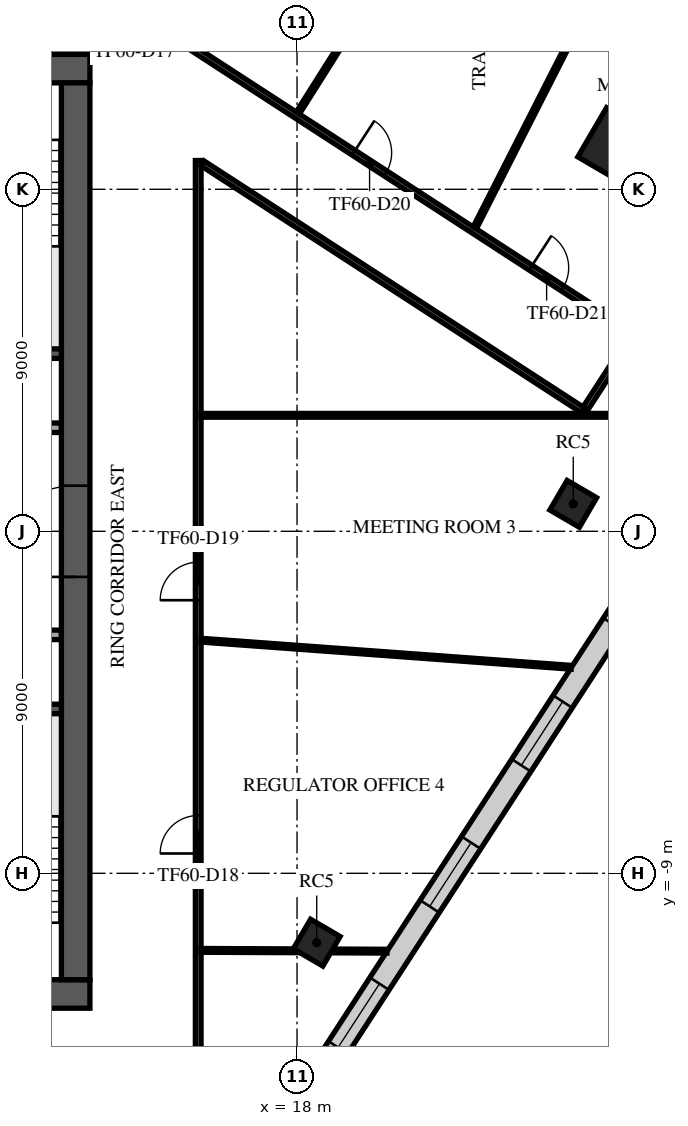
"""IFC4 building model, lengths in metres.
Left out: names, types, materials, properties, quantities, classifications, styles, units other than length and angle.
Written with IfcOpenShell. Run it as: python <this file> out.ifc"""

import sys

from ifc_helpers import new_model, si_unit, direction, frame, frame_2d, origin, origin_2d, place, context, subcontext, project, spatial, rectangle, extrude, element, fill, save


model = new_model("IFC4")
c1 = context("Model", 3, precision=1e-05, world=origin(), true_north=direction((0.0, 1.0)))
c2 = subcontext(c1, "Body", "Model", "MODEL_VIEW")
j1 = project(units=[si_unit("LENGTHUNIT", "METRE"), si_unit("PLANEANGLEUNIT", "RADIAN")], contexts=[c1])
p1 = place(None, origin())
s1 = spatial("IfcSite", under=j1, at=p1, CompositionType="ELEMENT")
p2 = place(p1, origin())
s2 = spatial("IfcBuilding", under=s1, at=p2, CompositionType="ELEMENT")
p3 = place(p2, frame((0.0, 0.0, 254.9)))
s3 = spatial("IfcBuildingStorey", under=s2, at=p3, CompositionType="ELEMENT", Elevation=254.9)
for number, where, z_axis, x_axis in (
    (1, (18.518, -10.825, 0.0), (0.0, 0.0, 1.0), (0.505, 0.863, 0.0)),
    (2, (25.268, 0.722, 0.0), (0.0, 0.0, 1.0), (0.505, 0.863, 0.0)),
):
    element("IfcColumn", number, at=place(p3, frame(where, z_axis=z_axis, x_axis=x_axis)), inside=s3, PredefinedType="COLUMN", context=c2, shape_type="SweptSolid", body=[
        extrude(rectangle(XDim=0.9, YDim=0.9, at=origin_2d()), origin(), (0.0, 0.0, 1.0), 4.0),
    ])
p4 = place(p3, frame((26.415, 10.122, 0.0), z_axis=(0.0, 0.0, 1.0), x_axis=(0.504643651291, 0.863327739165, 0.0)))
e3 = element("IfcColumn", 3, at=p4, inside=s3, PredefinedType="COLUMN", context=c2, shape_type="SweptSolid", body=[
    extrude(rectangle(XDim=1.5, YDim=1.5, at=origin_2d()), origin(), (0.0, 0.0, 1.0), 4.0),
])
p5 = place(p3, frame((-12.55, 12.175, 0.0), z_axis=(0.0, 0.0, 1.0), x_axis=(1.0, 0.0, 0.0)))
e4 = element("IfcWall", 4, at=p5, inside=s3, PredefinedType="SHEAR", context=c2, shape_type="SweptSolid", body=[
    extrude(rectangle(XDim=25.1, YDim=0.75, at=frame_2d((12.55, 0.0))), origin(), (0.0, 0.0, 1.0), 3.64),
])
p6 = place(p5, frame((11.35, 0.0, 0.0)))
e5 = element("IfcOpeningElement", 5, at=p6, cuts=e4, PredefinedType="OPENING", context=c2, shape_type="SweptSolid", body=[
    extrude(rectangle(XDim=2.4, YDim=2.4, at=frame_2d((1.2, 1.2))), frame((0.0, 0.385, 0.0), z_axis=(0.0, -1.0, 0.0), x_axis=(1.0, 0.0, 0.0)), (0.0, 0.0, 1.0), 0.77),
])
p7 = place(p5, frame((22.175, 0.0, 0.0)))
e6 = element("IfcOpeningElement", 6, at=p7, cuts=e4, PredefinedType="OPENING", context=c2, shape_type="SweptSolid", body=[
    extrude(rectangle(XDim=1.2, YDim=2.1, at=frame_2d((0.6, 1.05))), frame((0.0, 0.385, 0.0), z_axis=(0.0, -1.0, 0.0), x_axis=(1.0, 0.0, 0.0)), (0.0, 0.0, 1.0), 0.77),
])
p8 = place(p5, frame((1.15, 0.0, 0.0)))
e7 = element("IfcOpeningElement", 7, at=p8, cuts=e4, PredefinedType="OPENING", context=c2, shape_type="SweptSolid", body=[
    extrude(rectangle(XDim=1.0, YDim=2.1, at=frame_2d((0.5, 1.05))), frame((0.0, 0.385, 0.0), z_axis=(0.0, -1.0, 0.0), x_axis=(1.0, 0.0, 0.0)), (0.0, 0.0, 1.0), 0.77),
])
p9 = place(p3, frame((-12.55, -12.175, 0.0), z_axis=(0.0, 0.0, 1.0), x_axis=(1.0, 0.0, 0.0)))
e8 = element("IfcWall", 8, at=p9, inside=s3, PredefinedType="SHEAR", context=c2, shape_type="SweptSolid", body=[
    extrude(rectangle(XDim=25.1, YDim=0.75, at=frame_2d((12.55, 0.0))), origin(), (0.0, 0.0, 1.0), 3.64),
])
p10 = place(p9, frame((7.45, 0.0, 0.0)))
e9 = element("IfcOpeningElement", 9, at=p10, cuts=e8, PredefinedType="OPENING", context=c2, shape_type="SweptSolid", body=[
    extrude(rectangle(XDim=2.0, YDim=2.1, at=frame_2d((1.0, 1.05))), frame((0.0, 0.385, 0.0), z_axis=(0.0, -1.0, 0.0), x_axis=(1.0, 0.0, 0.0)), (0.0, 0.0, 1.0), 0.77),
])
p11 = place(p9, frame((17.575, 0.0, 0.0)))
e10 = element("IfcOpeningElement", 10, at=p11, cuts=e8, PredefinedType="OPENING", context=c2, shape_type="SweptSolid", body=[
    extrude(rectangle(XDim=1.2, YDim=2.1, at=frame_2d((0.6, 1.05))), frame((0.0, 0.385, 0.0), z_axis=(0.0, -1.0, 0.0), x_axis=(1.0, 0.0, 0.0)), (0.0, 0.0, 1.0), 0.77),
])
p12 = place(p9, frame((1.725, 0.0, 0.0)))
e11 = element("IfcOpeningElement", 11, at=p12, cuts=e8, PredefinedType="OPENING", context=c2, shape_type="SweptSolid", body=[
    extrude(rectangle(XDim=1.2, YDim=2.1, at=frame_2d((0.6, 1.05))), frame((0.0, 0.385, 0.0), z_axis=(0.0, -1.0, 0.0), x_axis=(1.0, 0.0, 0.0)), (0.0, 0.0, 1.0), 0.77),
])
p13 = place(p9, frame((22.175, 0.0, 0.0)))
e12 = element("IfcOpeningElement", 12, at=p13, cuts=e8, PredefinedType="OPENING", context=c2, shape_type="SweptSolid", body=[
    extrude(rectangle(XDim=1.2, YDim=2.1, at=frame_2d((0.6, 1.05))), frame((0.0, 0.385, 0.0), z_axis=(0.0, -1.0, 0.0), x_axis=(1.0, 0.0, 0.0)), (0.0, 0.0, 1.0), 0.77),
])
p14 = place(p3, frame((12.175, -11.8, 0.0), z_axis=(0.0, 0.0, 1.0), x_axis=(0.0, 1.0, 0.0)))
e13 = element("IfcWall", 13, at=p14, inside=s3, PredefinedType="SHEAR", context=c2, shape_type="SweptSolid", body=[
    extrude(rectangle(XDim=23.6, YDim=0.75, at=frame_2d((11.8, 0.0))), origin(), (0.0, 0.0, 1.0), 3.64),
])
p15 = place(p14, frame((10.6, 0.0, 0.0)))
e14 = element("IfcOpeningElement", 14, at=p15, cuts=e13, PredefinedType="OPENING", context=c2, shape_type="SweptSolid", body=[
    extrude(rectangle(XDim=2.4, YDim=2.4, at=frame_2d((1.2, 1.2))), frame((0.0, 0.385, 0.0), z_axis=(0.0, -1.0, 0.0), x_axis=(1.0, 0.0, 0.0)), (0.0, 0.0, 1.0), 0.77),
])
for number, where, z_axis, x_axis in (
    (15, (8.65, 4.675, 0.0), (0.0, 0.0, 1.0), (1.0, 0.0, 0.0)),
    (16, (8.65, -4.675, 0.0), (0.0, 0.0, 1.0), (1.0, 0.0, 0.0)),
):
    element("IfcWall", number, at=place(p3, frame(where, z_axis=z_axis, x_axis=x_axis)), inside=s3, PredefinedType="SOLIDWALL", context=c2, shape_type="SweptSolid", body=[
        extrude(rectangle(XDim=3.15, YDim=0.25, at=frame_2d((1.575, 0.0))), origin(), (0.0, 0.0, 1.0), 3.64),
    ])
p16 = place(p3, frame((5.63, -2.725, 0.0), z_axis=(0.0, 0.0, 1.0), x_axis=(1.0, 0.0, 0.0)))
e17 = element("IfcWall", 17, at=p16, inside=s3, PredefinedType="PARTITIONING", context=c2, shape_type="SweptSolid", body=[
    extrude(rectangle(XDim=6.165, YDim=0.25, at=frame_2d((3.083, 0.0))), origin(), (0.0, 0.0, 1.0), 3.64),
])
p17 = place(p16, frame((0.745, 0.0, 0.0)))
e18 = element("IfcOpeningElement", 18, at=p17, cuts=e17, PredefinedType="OPENING", context=c2, shape_type="SweptSolid", body=[
    extrude(rectangle(XDim=1.0, YDim=2.1, at=frame_2d((0.5, 1.05))), frame((0.0, 0.135, 0.0), z_axis=(0.0, -1.0, 0.0), x_axis=(1.0, 0.0, 0.0)), (0.0, 0.0, 1.0), 0.27),
])
p18 = place(p16, frame((3.92, 0.0, 0.0)))
e19 = element("IfcOpeningElement", 19, at=p18, cuts=e17, PredefinedType="OPENING", context=c2, shape_type="SweptSolid", body=[
    extrude(rectangle(XDim=0.9, YDim=2.1, at=frame_2d((0.45, 1.05))), frame((0.0, 0.135, 0.0), z_axis=(0.0, -1.0, 0.0), x_axis=(1.0, 0.0, 0.0)), (0.0, 0.0, 1.0), 0.27),
])
p19 = place(p3, frame((-11.795, 2.725, 0.0), z_axis=(0.0, 0.0, 1.0), x_axis=(1.0, 0.0, 0.0)))
e20 = element("IfcWall", 20, at=p19, inside=s3, PredefinedType="PARTITIONING", context=c2, shape_type="SweptSolid", body=[
    extrude(rectangle(XDim=23.59, YDim=0.25, at=frame_2d((11.795, 0.0))), origin(), (0.0, 0.0, 1.0), 3.64),
])
p20 = place(p19, frame((21.345, 0.0, 0.0)))
e21 = element("IfcOpeningElement", 21, at=p20, cuts=e20, PredefinedType="OPENING", context=c2, shape_type="SweptSolid", body=[
    extrude(rectangle(XDim=0.9, YDim=2.1, at=frame_2d((0.45, 1.05))), frame((0.0, 0.135, 0.0), z_axis=(0.0, -1.0, 0.0), x_axis=(1.0, 0.0, 0.0)), (0.0, 0.0, 1.0), 0.27),
])
p21 = place(p19, frame((1.345, 0.0, 0.0)))
e22 = element("IfcOpeningElement", 22, at=p21, cuts=e20, PredefinedType="OPENING", context=c2, shape_type="SweptSolid", body=[
    extrude(rectangle(XDim=0.9, YDim=2.1, at=frame_2d((0.45, 1.05))), frame((0.0, 0.135, 0.0), z_axis=(0.0, -1.0, 0.0), x_axis=(1.0, 0.0, 0.0)), (0.0, 0.0, 1.0), 0.27),
])
p22 = place(p19, frame((4.32, 0.0, 0.0)))
e23 = element("IfcOpeningElement", 23, at=p22, cuts=e20, PredefinedType="OPENING", context=c2, shape_type="SweptSolid", body=[
    extrude(rectangle(XDim=1.2, YDim=2.1, at=frame_2d((0.6, 1.05))), frame((0.0, 0.135, 0.0), z_axis=(0.0, -1.0, 0.0), x_axis=(1.0, 0.0, 0.0)), (0.0, 0.0, 1.0), 0.27),
])
p23 = place(p19, frame((12.57, 0.0, 0.0)))
e24 = element("IfcOpeningElement", 24, at=p23, cuts=e20, PredefinedType="OPENING", context=c2, shape_type="SweptSolid", body=[
    extrude(rectangle(XDim=1.2, YDim=2.1, at=frame_2d((0.6, 1.05))), frame((0.0, 0.135, 0.0), z_axis=(0.0, -1.0, 0.0), x_axis=(1.0, 0.0, 0.0)), (0.0, 0.0, 1.0), 0.27),
])
p24 = place(p3, frame((6.367, -33.16, 0.0), z_axis=(0.0, 0.0, 1.0), x_axis=(0.544637371147, 0.838671648472, 0.0)))
e25 = element("IfcWall", 25, at=p24, inside=s3, PredefinedType="STANDARD", context=c2, shape_type="SweptSolid", body=[
    extrude(rectangle(XDim=48.686, YDim=0.6, at=frame_2d((24.343, 0.0))), origin(), (0.0, 0.0, 1.0), 3.64),
])
p25 = place(p24, frame((1.213, 0.0, 0.9)))
e26 = element("IfcOpeningElement", 26, at=p25, cuts=e25, PredefinedType="OPENING", context=c2, shape_type="SweptSolid", body=[
    extrude(rectangle(XDim=2.0, YDim=2.1, at=frame_2d((1.0, 1.05))), frame((0.0, 0.31, 0.0), z_axis=(0.0, -1.0, 0.0), x_axis=(1.0, 0.0, 0.0)), (0.0, 0.0, 1.0), 0.62),
])
p26 = place(p24, frame((5.639, 0.0, 0.9)))
e27 = element("IfcOpeningElement", 27, at=p26, cuts=e25, PredefinedType="OPENING", context=c2, shape_type="SweptSolid", body=[
    extrude(rectangle(XDim=2.0, YDim=2.1, at=frame_2d((1.0, 1.05))), frame((0.0, 0.31, 0.0), z_axis=(0.0, -1.0, 0.0), x_axis=(1.0, 0.0, 0.0)), (0.0, 0.0, 1.0), 0.62),
])
p27 = place(p24, frame((14.491, 0.0, 0.9)))
e28 = element("IfcOpeningElement", 28, at=p27, cuts=e25, PredefinedType="OPENING", context=c2, shape_type="SweptSolid", body=[
    extrude(rectangle(XDim=2.0, YDim=2.1, at=frame_2d((1.0, 1.05))), frame((0.0, 0.31, 0.0), z_axis=(0.0, -1.0, 0.0), x_axis=(1.0, 0.0, 0.0)), (0.0, 0.0, 1.0), 0.62),
])
p28 = place(p24, frame((18.917, 0.0, 0.9)))
e29 = element("IfcOpeningElement", 29, at=p28, cuts=e25, PredefinedType="OPENING", context=c2, shape_type="SweptSolid", body=[
    extrude(rectangle(XDim=2.0, YDim=2.1, at=frame_2d((1.0, 1.05))), frame((0.0, 0.31, 0.0), z_axis=(0.0, -1.0, 0.0), x_axis=(1.0, 0.0, 0.0)), (0.0, 0.0, 1.0), 0.62),
])
p29 = place(p24, frame((23.343, 0.0, 0.9)))
e30 = element("IfcOpeningElement", 30, at=p29, cuts=e25, PredefinedType="OPENING", context=c2, shape_type="SweptSolid", body=[
    extrude(rectangle(XDim=2.0, YDim=2.1, at=frame_2d((1.0, 1.05))), frame((0.0, 0.31, 0.0), z_axis=(0.0, -1.0, 0.0), x_axis=(1.0, 0.0, 0.0)), (0.0, 0.0, 1.0), 0.62),
])
p30 = place(p24, frame((27.769, 0.0, 0.9)))
e31 = element("IfcOpeningElement", 31, at=p30, cuts=e25, PredefinedType="OPENING", context=c2, shape_type="SweptSolid", body=[
    extrude(rectangle(XDim=2.0, YDim=2.1, at=frame_2d((1.0, 1.05))), frame((0.0, 0.31, 0.0), z_axis=(0.0, -1.0, 0.0), x_axis=(1.0, 0.0, 0.0)), (0.0, 0.0, 1.0), 0.62),
])
p31 = place(p24, frame((32.195, 0.0, 0.9)))
e32 = element("IfcOpeningElement", 32, at=p31, cuts=e25, PredefinedType="OPENING", context=c2, shape_type="SweptSolid", body=[
    extrude(rectangle(XDim=2.0, YDim=2.1, at=frame_2d((1.0, 1.05))), frame((0.0, 0.31, 0.0), z_axis=(0.0, -1.0, 0.0), x_axis=(1.0, 0.0, 0.0)), (0.0, 0.0, 1.0), 0.62),
])
p32 = place(p24, frame((36.621, 0.0, 0.9)))
e33 = element("IfcOpeningElement", 33, at=p32, cuts=e25, PredefinedType="OPENING", context=c2, shape_type="SweptSolid", body=[
    extrude(rectangle(XDim=2.0, YDim=2.1, at=frame_2d((1.0, 1.05))), frame((0.0, 0.31, 0.0), z_axis=(0.0, -1.0, 0.0), x_axis=(1.0, 0.0, 0.0)), (0.0, 0.0, 1.0), 0.62),
])
p33 = place(p24, frame((41.047, 0.0, 0.9)))
e34 = element("IfcOpeningElement", 34, at=p33, cuts=e25, PredefinedType="OPENING", context=c2, shape_type="SweptSolid", body=[
    extrude(rectangle(XDim=2.0, YDim=2.1, at=frame_2d((1.0, 1.05))), frame((0.0, 0.31, 0.0), z_axis=(0.0, -1.0, 0.0), x_axis=(1.0, 0.0, 0.0)), (0.0, 0.0, 1.0), 0.62),
])
p34 = place(p24, frame((45.473, 0.0, 0.9)))
e35 = element("IfcOpeningElement", 35, at=p34, cuts=e25, PredefinedType="OPENING", context=c2, shape_type="SweptSolid", body=[
    extrude(rectangle(XDim=2.0, YDim=2.1, at=frame_2d((1.0, 1.05))), frame((0.0, 0.31, 0.0), z_axis=(0.0, -1.0, 0.0), x_axis=(1.0, 0.0, 0.0)), (0.0, 0.0, 1.0), 0.62),
])
p35 = place(p3, frame((-6.127, 26.598, 0.0), z_axis=(0.0, 0.0, 1.0), x_axis=(0.838670911559, -0.544638505897, 0.0)))
e36 = element("IfcWall", 36, at=p35, inside=s3, PredefinedType="PARTITIONING", context=c2, shape_type="SweptSolid", body=[
    extrude(rectangle(XDim=39.325, YDim=0.15, at=frame_2d((19.663, 0.0))), origin(), (0.0, 0.0, 1.0), 3.04),
])
p36 = place(p35, frame((9.3, 0.0, 0.0)))
e37 = element("IfcOpeningElement", 37, at=p36, cuts=e36, PredefinedType="OPENING", context=c2, shape_type="SweptSolid", body=[
    extrude(rectangle(XDim=1.8, YDim=2.1, at=frame_2d((0.9, 1.05))), frame((0.0, 0.085, 0.0), z_axis=(0.0, -1.0, 0.0), x_axis=(1.0, 0.0, 0.0)), (0.0, 0.0, 1.0), 0.17),
])
p37 = place(p35, frame((12.185, 0.0, 0.0)))
e38 = element("IfcOpeningElement", 38, at=p37, cuts=e36, PredefinedType="OPENING", context=c2, shape_type="SweptSolid", body=[
    extrude(rectangle(XDim=1.0, YDim=2.1, at=frame_2d((0.5, 1.05))), frame((0.0, 0.085, 0.0), z_axis=(0.0, -1.0, 0.0), x_axis=(1.0, 0.0, 0.0)), (0.0, 0.0, 1.0), 0.17),
])
p38 = place(p35, frame((23.155, 0.0, 0.0)))
e39 = element("IfcOpeningElement", 39, at=p38, cuts=e36, PredefinedType="OPENING", context=c2, shape_type="SweptSolid", body=[
    extrude(rectangle(XDim=1.0, YDim=2.1, at=frame_2d((0.5, 1.05))), frame((0.0, 0.085, 0.0), z_axis=(0.0, -1.0, 0.0), x_axis=(1.0, 0.0, 0.0)), (0.0, 0.0, 1.0), 0.17),
])
p39 = place(p35, frame((30.544, 0.0, 0.0)))
e40 = element("IfcOpeningElement", 40, at=p39, cuts=e36, PredefinedType="OPENING", context=c2, shape_type="SweptSolid", body=[
    extrude(rectangle(XDim=1.0, YDim=2.1, at=frame_2d((0.5, 1.05))), frame((0.0, 0.085, 0.0), z_axis=(0.0, -1.0, 0.0), x_axis=(1.0, 0.0, 0.0)), (0.0, 0.0, 1.0), 0.17),
])
p40 = place(p35, frame((36.099, 0.0, 0.0)))
e41 = element("IfcOpeningElement", 41, at=p40, cuts=e36, PredefinedType="OPENING", context=c2, shape_type="SweptSolid", body=[
    extrude(rectangle(XDim=1.0, YDim=2.1, at=frame_2d((0.5, 1.05))), frame((0.0, 0.085, 0.0), z_axis=(0.0, -1.0, 0.0), x_axis=(1.0, 0.0, 0.0)), (0.0, 0.0, 1.0), 0.17),
])
p41 = place(p3, frame((15.4, -15.325, 0.0), z_axis=(0.0, 0.0, 1.0), x_axis=(0.0, 1.0, 0.0)))
e42 = element("IfcWall", 42, at=p41, inside=s3, PredefinedType="PARTITIONING", context=c2, shape_type="SweptSolid", body=[
    extrude(rectangle(XDim=25.082, YDim=0.15, at=frame_2d((12.541, 0.0))), origin(), (0.0, 0.0, 1.0), 3.24),
])
p42 = place(p41, frame((6.847, 0.0, 0.0)))
e43 = element("IfcOpeningElement", 43, at=p42, cuts=e42, PredefinedType="OPENING", context=c2, shape_type="SweptSolid", body=[
    extrude(rectangle(XDim=1.0, YDim=2.1, at=frame_2d((0.5, 1.05))), frame((0.0, 0.085, 0.0), z_axis=(0.0, -1.0, 0.0), x_axis=(1.0, 0.0, 0.0)), (0.0, 0.0, 1.0), 0.17),
])
p43 = place(p41, frame((13.512, 0.0, 0.0)))
e44 = element("IfcOpeningElement", 44, at=p43, cuts=e42, PredefinedType="OPENING", context=c2, shape_type="SweptSolid", body=[
    extrude(rectangle(XDim=1.0, YDim=2.1, at=frame_2d((0.5, 1.05))), frame((0.0, 0.085, 0.0), z_axis=(0.0, -1.0, 0.0), x_axis=(1.0, 0.0, 0.0)), (0.0, 0.0, 1.0), 0.17),
])
p44 = place(p3, frame((15.516, 9.682, 0.0), z_axis=(0.0, 0.0, 1.0), x_axis=(0.838687901934, -0.544612342083, 0.0)))
e45 = element("IfcWall", 45, at=p44, inside=s3, PredefinedType="PARTITIONING", context=c2, shape_type="SweptSolid", body=[
    extrude(rectangle(XDim=11.961, YDim=0.15, at=frame_2d((5.98, 0.0))), origin(), (0.0, 0.0, 1.0), 3.04),
])
p45 = place(p3, frame((25.588, 3.231, 0.0), z_axis=(0.0, 0.0, 1.0), x_axis=(0.544690717141, 0.838637002916, 0.0)))
e46 = element("IfcWall", 46, at=p45, inside=s3, PredefinedType="PARTITIONING", context=c2, shape_type="SweptSolid", body=[
    extrude(rectangle(XDim=2.249, YDim=0.15, at=frame_2d((1.125, 0.0))), origin(), (0.0, 0.0, 1.0), 3.04),
])
p46 = place(p3, frame((15.475, 3.052, 0.0), z_axis=(0.0, 0.0, 1.0), x_axis=(1.0, 0.0, 0.0)))
e47 = element("IfcWall", 47, at=p46, inside=s3, PredefinedType="PARTITIONING", context=c2, shape_type="SweptSolid", body=[
    extrude(rectangle(XDim=14.048, YDim=0.1, at=frame_2d((7.024, 0.0))), origin(), (0.0, 0.0, 1.0), 3.04),
])
p47 = place(p3, frame((15.475, -11.028, 0.0), z_axis=(0.0, 0.0, 1.0), x_axis=(0.999991302711, -0.004170671777, 0.0)))
e48 = element("IfcWall", 48, at=p47, inside=s3, PredefinedType="PARTITIONING", context=c2, shape_type="SweptSolid", body=[
    extrude(rectangle(XDim=2.517, YDim=0.1, at=frame_2d((1.259, 0.0))), origin(), (0.0, 0.0, 1.0), 3.12),
])
p48 = place(p3, frame((15.479, -2.866, 0.0), z_axis=(0.0, 0.0, 1.0), x_axis=(0.997329416564, -0.073034477181, 0.0)))
e49 = element("IfcWall", 49, at=p48, inside=s3, PredefinedType="PARTITIONING", context=c2, shape_type="SweptSolid", body=[
    extrude(rectangle(XDim=9.764, YDim=0.1, at=frame_2d((4.882, 0.0))), origin(), (0.0, 0.0, 1.0), 3.04),
])
p49 = place(p3, frame((18.021, 11.007, 0.0), z_axis=(0.0, 0.0, 1.0), x_axis=(0.53413665333, 0.845398152097, 0.0)))
e50 = element("IfcWall", 50, at=p49, inside=s3, PredefinedType="PARTITIONING", context=c2, shape_type="SweptSolid", body=[
    extrude(rectangle(XDim=7.864, YDim=0.1, at=frame_2d((3.932, 0.0))), origin(), (0.0, 0.0, 1.0), 3.24),
])
p50 = place(p3, frame((18.912, -11.043, 0.0), z_axis=(0.0, 0.0, 1.0), x_axis=(0.999990472014, -0.004365304277, 0.0)))
e51 = element("IfcWall", 51, at=p50, inside=s3, PredefinedType="PARTITIONING", context=c2, shape_type="SweptSolid", body=[
    extrude(rectangle(XDim=1.454, YDim=0.1, at=frame_2d((0.727, 0.0))), origin(), (0.0, 0.0, 1.0), 3.64),
])
p51 = place(p3, frame((22.679, 7.987, 0.0), z_axis=(0.0, 0.0, 1.0), x_axis=(0.453387595121, 0.891313462588, 0.0)))
e52 = element("IfcWall", 52, at=p51, inside=s3, PredefinedType="PARTITIONING", context=c2, shape_type="SweptSolid", body=[
    extrude(rectangle(XDim=10.406, YDim=0.1, at=frame_2d((5.203, 0.0))), origin(), (0.0, 0.0, 1.0), 3.04),
])
p52 = place(p15, origin())
e53 = element("IfcDoor", 53, at=p52, inside=s3, OperationType="SINGLE_SWING_LEFT", PredefinedType="DOOR", context=c2, shape_type="SweptSolid", body=[
    extrude(rectangle(XDim=2.4, YDim=2.4, at=frame_2d((1.2, 1.2))), frame((0.0, 0.025, 0.0), z_axis=(0.0, -1.0, 0.0), x_axis=(1.0, 0.0, 0.0)), (0.0, 0.0, 1.0), 0.05),
])
fill(e14, e53)
p53 = place(p29, origin())
e54 = element("IfcWindow", 54, at=p53, inside=s3, PartitioningType="SINGLE_PANEL", PredefinedType="WINDOW", context=c2, shape_type="SweptSolid", body=[
    extrude(rectangle(XDim=2.0, YDim=2.1, at=frame_2d((1.0, 1.05))), frame((0.0, 0.03, 0.0), z_axis=(0.0, -1.0, 0.0), x_axis=(1.0, 0.0, 0.0)), (0.0, 0.0, 1.0), 0.06),
])
fill(e30, e54)
p54 = place(p30, origin())
e55 = element("IfcWindow", 55, at=p54, inside=s3, PartitioningType="SINGLE_PANEL", PredefinedType="WINDOW", context=c2, shape_type="SweptSolid", body=[
    extrude(rectangle(XDim=2.0, YDim=2.1, at=frame_2d((1.0, 1.05))), frame((0.0, 0.03, 0.0), z_axis=(0.0, -1.0, 0.0), x_axis=(1.0, 0.0, 0.0)), (0.0, 0.0, 1.0), 0.06),
])
fill(e31, e55)
p55 = place(p31, origin())
e56 = element("IfcWindow", 56, at=p55, inside=s3, PartitioningType="SINGLE_PANEL", PredefinedType="WINDOW", context=c2, shape_type="SweptSolid", body=[
    extrude(rectangle(XDim=2.0, YDim=2.1, at=frame_2d((1.0, 1.05))), frame((0.0, 0.03, 0.0), z_axis=(0.0, -1.0, 0.0), x_axis=(1.0, 0.0, 0.0)), (0.0, 0.0, 1.0), 0.06),
])
fill(e32, e56)
p56 = place(p42, frame((1.0, 0.0, 0.0), z_axis=(0.0, 0.0, 1.0), x_axis=(-1.0, 0.0, 0.0)))
e57 = element("IfcDoor", 57, at=p56, inside=s3, OperationType="SINGLE_SWING_RIGHT", PredefinedType="DOOR", context=c2, shape_type="SweptSolid", body=[
    extrude(rectangle(XDim=1.0, YDim=2.1, at=frame_2d((0.5, 1.05))), frame((0.0, 0.025, 0.0), z_axis=(0.0, -1.0, 0.0), x_axis=(1.0, 0.0, 0.0)), (0.0, 0.0, 1.0), 0.05),
])
fill(e43, e57)
p57 = place(p43, frame((1.0, 0.0, 0.0), z_axis=(0.0, 0.0, 1.0), x_axis=(-1.0, 0.0, 0.0)))
e58 = element("IfcDoor", 58, at=p57, inside=s3, OperationType="SINGLE_SWING_LEFT", PredefinedType="DOOR", context=c2, shape_type="SweptSolid", body=[
    extrude(rectangle(XDim=1.0, YDim=2.1, at=frame_2d((0.5, 1.05))), frame((0.0, 0.025, 0.0), z_axis=(0.0, -1.0, 0.0), x_axis=(1.0, 0.0, 0.0)), (0.0, 0.0, 1.0), 0.05),
])
fill(e44, e58)
p58 = place(p39, origin())
e59 = element("IfcDoor", 59, at=p58, inside=s3, OperationType="SINGLE_SWING_RIGHT", PredefinedType="DOOR", context=c2, shape_type="SweptSolid", body=[
    extrude(rectangle(XDim=1.0, YDim=2.1, at=frame_2d((0.5, 1.05))), frame((0.0, 0.025, 0.0), z_axis=(0.0, -1.0, 0.0), x_axis=(1.0, 0.0, 0.0)), (0.0, 0.0, 1.0), 0.05),
])
fill(e40, e59)
p59 = place(p40, origin())
e60 = element("IfcDoor", 60, at=p59, inside=s3, OperationType="SINGLE_SWING_RIGHT", PredefinedType="DOOR", context=c2, shape_type="SweptSolid", body=[
    extrude(rectangle(XDim=1.0, YDim=2.1, at=frame_2d((0.5, 1.05))), frame((0.0, 0.025, 0.0), z_axis=(0.0, -1.0, 0.0), x_axis=(1.0, 0.0, 0.0)), (0.0, 0.0, 1.0), 0.05),
])
fill(e41, e60)
save(model, sys.argv[1])
